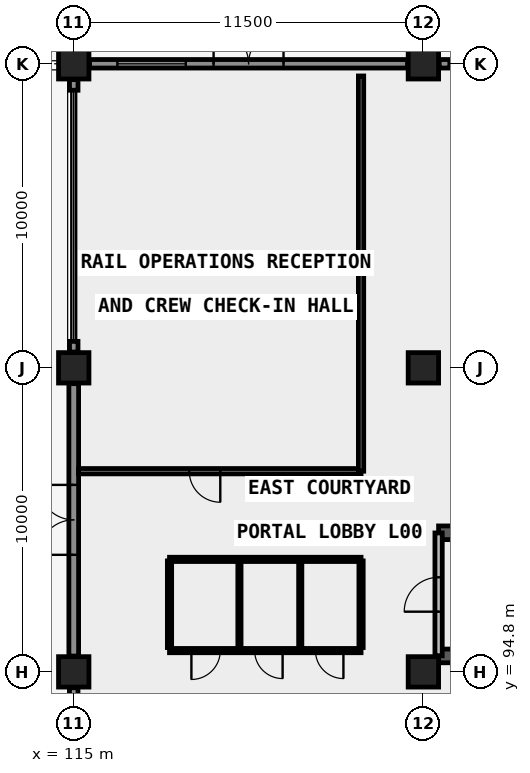
"""IFC4 building model, lengths in metres.
Left out: names, types, materials, properties, quantities, classifications, styles, units other than length and angle.
Written with IfcOpenShell. Run it as: python <this file> out.ifc"""

import sys

from ifc_helpers import new_model, si_unit, direction, frame, frame_2d, origin, origin_2d, place, context, subcontext, project, spatial, rectangle, extrude, element, fill, save


model = new_model("IFC4")
c1 = context("Model", 3, precision=1e-05, world=origin(), true_north=direction((0.0, 1.0)))
c2 = subcontext(c1, "Body", "Model", "MODEL_VIEW")
j1 = project(units=[si_unit("LENGTHUNIT", "METRE"), si_unit("PLANEANGLEUNIT", "RADIAN")], contexts=[c1])
p1 = place(None, origin())
s1 = spatial("IfcSite", under=j1, at=p1, CompositionType="ELEMENT")
p2 = place(p1, origin())
s2 = spatial("IfcBuilding", under=s1, at=p2, CompositionType="ELEMENT")
p3 = place(p2, origin())
s3 = spatial("IfcBuildingStorey", under=s2, at=p3, CompositionType="ELEMENT", Elevation=0.0)
for number, where, z_axis, x_axis in (
    (1, (115.0, 94.8, 0.0), (0.0, 0.0, 1.0), (1.0, 0.0, 0.0)),
    (2, (115.0, 104.8, 0.0), (0.0, 0.0, 1.0), (1.0, 0.0, 0.0)),
    (3, (115.0, 114.8, 0.0), (0.0, 0.0, 1.0), (1.0, 0.0, 0.0)),
    (4, (126.5, 94.8, 0.0), (0.0, 0.0, 1.0), (1.0, 0.0, 0.0)),
    (5, (126.5, 104.8, 0.0), (0.0, 0.0, 1.0), (1.0, 0.0, 0.0)),
    (6, (126.5, 114.8, 0.0), (0.0, 0.0, 1.0), (1.0, 0.0, 0.0)),
):
    element("IfcColumn", number, at=place(p3, frame(where, z_axis=z_axis, x_axis=x_axis)), inside=s3, PredefinedType="COLUMN", context=c2, shape_type="SweptSolid", body=[
        extrude(rectangle(XDim=1.0, YDim=1.0, at=origin_2d()), origin(), (0.0, 0.0, 1.0), 4.2),
    ])
p4 = place(p3, frame((127.0, 95.325, 0.0), z_axis=(0.0, 0.0, 1.0), x_axis=(1.0, 0.0, 0.0)))
e7 = element("IfcWall", 7, at=p4, inside=s3, PredefinedType="SHEAR", context=c2, shape_type="SweptSolid", body=[
    extrude(rectangle(XDim=9.15, YDim=0.45, at=frame_2d((4.575, 0.0))), origin(), (0.0, 0.0, 1.0), 4.2),
])
p5 = place(p3, frame((127.0, 99.375, 0.0), z_axis=(0.0, 0.0, 1.0), x_axis=(1.0, 0.0, 0.0)))
e8 = element("IfcWall", 8, at=p5, inside=s3, PredefinedType="SHEAR", context=c2, shape_type="SweptSolid", body=[
    extrude(rectangle(XDim=9.15, YDim=0.45, at=frame_2d((4.575, 0.0))), origin(), (0.0, 0.0, 1.0), 4.2),
])
p6 = place(p5, frame((0.55, 0.0, 0.0)))
e9 = element("IfcOpeningElement", 9, at=p6, cuts=e8, PredefinedType="OPENING", context=c2, shape_type="SweptSolid", body=[
    extrude(rectangle(XDim=1.13, YDim=2.15, at=frame_2d((0.565, 1.075))), frame((0.0, 0.235, 0.0), z_axis=(0.0, -1.0, 0.0), x_axis=(1.0, 0.0, 0.0)), (0.0, 0.0, 1.0), 0.47),
])
p7 = place(p3, frame((115.52, 114.8, 0.0), z_axis=(0.0, 0.0, 1.0), x_axis=(1.0, 0.0, 0.0)))
e10 = element("IfcWall", 10, at=p7, inside=s3, PredefinedType="SOLIDWALL", context=c2, shape_type="SweptSolid", body=[
    extrude(rectangle(XDim=10.46, YDim=0.28, at=frame_2d((5.23, 0.0))), origin(), (0.0, 0.0, 1.0), 3.15),
])
p8 = place(p7, frame((4.08, 0.0, 0.0)))
e11 = element("IfcOpeningElement", 11, at=p8, cuts=e10, PredefinedType="OPENING", context=c2, shape_type="SweptSolid", body=[
    extrude(rectangle(XDim=2.3, YDim=2.55, at=frame_2d((1.15, 1.275))), frame((0.0, 0.15, 0.0), z_axis=(0.0, -1.0, 0.0), x_axis=(1.0, 0.0, 0.0)), (0.0, 0.0, 1.0), 0.3),
])
p9 = place(p7, frame((0.915, 0.0, 0.78)))
e12 = element("IfcOpeningElement", 12, at=p9, cuts=e10, PredefinedType="OPENING", context=c2, shape_type="SweptSolid", body=[
    extrude(rectangle(XDim=2.25, YDim=2.05, at=frame_2d((1.125, 1.025))), frame((0.0, 0.15, 0.0), z_axis=(0.0, -1.0, 0.0), x_axis=(1.0, 0.0, 0.0)), (0.0, 0.0, 1.0), 0.3),
])
for number, where, z_axis, x_axis in (
    (13, (127.02, 114.8, 0.0), (0.0, 0.0, 1.0), (1.0, 0.0, 0.0)),
    (14, (115.0, 93.93, 0.0), (0.0, 0.0, 1.0), (0.0, 1.0, 0.0)),
):
    element("IfcWall", number, at=place(p3, frame(where, z_axis=z_axis, x_axis=x_axis)), inside=s3, PredefinedType="SOLIDWALL", context=c2, shape_type="SweptSolid", body=[
        extrude(rectangle(XDim=0.35, YDim=0.28, at=frame_2d((0.175, 0.0))), origin(), (0.0, 0.0, 1.0), 3.93),
    ])
p10 = place(p3, frame((115.0, 95.32, 0.0), z_axis=(0.0, 0.0, 1.0), x_axis=(0.0, 1.0, 0.0)))
e15 = element("IfcWall", 15, at=p10, inside=s3, PredefinedType="SOLIDWALL", context=c2, shape_type="SweptSolid", body=[
    extrude(rectangle(XDim=8.96, YDim=0.32, at=frame_2d((4.48, 0.0))), origin(), (0.0, 0.0, 1.0), 3.15),
])
p11 = place(p10, frame((3.33, 0.0, 0.0)))
e16 = element("IfcOpeningElement", 16, at=p11, cuts=e15, PredefinedType="OPENING", context=c2, shape_type="SweptSolid", body=[
    extrude(rectangle(XDim=2.3, YDim=2.55, at=frame_2d((1.15, 1.275))), frame((0.0, 0.17, 0.0), z_axis=(0.0, -1.0, 0.0), x_axis=(1.0, 0.0, 0.0)), (0.0, 0.0, 1.0), 0.34),
])
p12 = place(p3, frame((115.0, 105.32, 0.0), z_axis=(0.0, 0.0, 1.0), x_axis=(0.0, 1.0, 0.0)))
e17 = element("IfcWall", 17, at=p12, inside=s3, PredefinedType="SOLIDWALL", context=c2, shape_type="SweptSolid", body=[
    extrude(rectangle(XDim=0.35, YDim=0.28, at=frame_2d((0.175, 0.0))), origin(), (0.0, 0.0, 1.0), 3.93),
])
p13 = place(p3, frame((115.0, 113.93, 0.0), z_axis=(0.0, 0.0, 1.0), x_axis=(0.0, 1.0, 0.0)))
e18 = element("IfcWall", 18, at=p13, inside=s3, PredefinedType="SOLIDWALL", context=c2, shape_type="SweptSolid", body=[
    extrude(rectangle(XDim=0.35, YDim=0.28, at=frame_2d((0.175, 0.0))), origin(), (0.0, 0.0, 1.0), 3.93),
])
p14 = place(p3, frame((127.0, 95.33, 0.0), z_axis=(0.0, 0.0, 1.0), x_axis=(0.0, 1.0, 0.0)))
e19 = element("IfcWall", 19, at=p14, inside=s3, PredefinedType="SOLIDWALL", context=c2, shape_type="SweptSolid", body=[
    extrude(rectangle(XDim=4.04, YDim=0.24, at=frame_2d((2.02, 0.0))), origin(), (0.0, 0.0, 1.0), 3.88),
])
p15 = place(p14, frame((1.45, 0.0, 0.0)))
e20 = element("IfcOpeningElement", 20, at=p15, cuts=e19, PredefinedType="OPENING", context=c2, shape_type="SweptSolid", body=[
    extrude(rectangle(XDim=1.13, YDim=2.15, at=frame_2d((0.565, 1.075))), frame((0.0, 0.13, 0.0), z_axis=(0.0, -1.0, 0.0), x_axis=(1.0, 0.0, 0.0)), (0.0, 0.0, 1.0), 0.26),
])
p16 = place(p3, frame((118.15, 95.5, 0.0), z_axis=(0.0, 0.0, 1.0), x_axis=(1.0, 0.0, 0.0)))
e21 = element("IfcWall", 21, at=p16, inside=s3, PredefinedType="PLUMBINGWALL", context=c2, shape_type="SweptSolid", body=[
    extrude(rectangle(XDim=6.3, YDim=0.14, at=frame_2d((3.15, 0.0))), origin(), (0.0, 0.0, 1.0), 3.88),
])
p17 = place(p16, frame((0.72, 0.0, 0.0)))
e22 = element("IfcOpeningElement", 22, at=p17, cuts=e21, PredefinedType="OPENING", context=c2, shape_type="SweptSolid", body=[
    extrude(rectangle(XDim=0.95, YDim=2.1, at=frame_2d((0.475, 1.05))), frame((0.0, 0.08, 0.0), z_axis=(0.0, -1.0, 0.0), x_axis=(1.0, 0.0, 0.0)), (0.0, 0.0, 1.0), 0.16),
])
p18 = place(p16, frame((2.8, 0.0, 0.0)))
e23 = element("IfcOpeningElement", 23, at=p18, cuts=e21, PredefinedType="OPENING", context=c2, shape_type="SweptSolid", body=[
    extrude(rectangle(XDim=0.92, YDim=2.1, at=frame_2d((0.46, 1.05))), frame((0.0, 0.08, 0.0), z_axis=(0.0, -1.0, 0.0), x_axis=(1.0, 0.0, 0.0)), (0.0, 0.0, 1.0), 0.16),
])
p19 = place(p16, frame((4.8, 0.0, 0.0)))
e24 = element("IfcOpeningElement", 24, at=p19, cuts=e21, PredefinedType="OPENING", context=c2, shape_type="SweptSolid", body=[
    extrude(rectangle(XDim=0.92, YDim=2.1, at=frame_2d((0.46, 1.05))), frame((0.0, 0.08, 0.0), z_axis=(0.0, -1.0, 0.0), x_axis=(1.0, 0.0, 0.0)), (0.0, 0.0, 1.0), 0.16),
])
p20 = place(p3, frame((118.15, 95.6, 0.0), z_axis=(0.0, 0.0, 1.0), x_axis=(0.0, 1.0, 0.0)))
e25 = element("IfcWall", 25, at=p20, inside=s3, PredefinedType="PLUMBINGWALL", context=c2, shape_type="SweptSolid", body=[
    extrude(rectangle(XDim=2.85, YDim=0.14, at=frame_2d((1.425, 0.0))), origin(), (0.0, 0.0, 1.0), 3.88),
])
for number, where, z_axis, x_axis in (
    (26, (120.45, 95.6, 0.0), (0.0, 0.0, 1.0), (0.0, 1.0, 0.0)),
    (27, (122.45, 95.6, 0.0), (0.0, 0.0, 1.0), (0.0, 1.0, 0.0)),
):
    element("IfcWall", number, at=place(p3, frame(where, z_axis=z_axis, x_axis=x_axis)), inside=s3, PredefinedType="PARTITIONING", context=c2, shape_type="SweptSolid", body=[
        extrude(rectangle(XDim=2.85, YDim=0.105, at=frame_2d((1.425, 0.0))), origin(), (0.0, 0.0, 1.0), 3.88),
    ])
p21 = place(p3, frame((124.45, 95.6, 0.0), z_axis=(0.0, 0.0, 1.0), x_axis=(0.0, 1.0, 0.0)))
e28 = element("IfcWall", 28, at=p21, inside=s3, PredefinedType="PLUMBINGWALL", context=c2, shape_type="SweptSolid", body=[
    extrude(rectangle(XDim=2.85, YDim=0.14, at=frame_2d((1.425, 0.0))), origin(), (0.0, 0.0, 1.0), 3.88),
])
p22 = place(p3, frame((118.15, 98.5, 0.0), z_axis=(0.0, 0.0, 1.0), x_axis=(1.0, 0.0, 0.0)))
e29 = element("IfcWall", 29, at=p22, inside=s3, PredefinedType="PLUMBINGWALL", context=c2, shape_type="SweptSolid", body=[
    extrude(rectangle(XDim=6.3, YDim=0.14, at=frame_2d((3.15, 0.0))), origin(), (0.0, 0.0, 1.0), 3.88),
])
p23 = place(p3, frame((115.16, 101.4, 0.0), z_axis=(0.0, 0.0, 1.0), x_axis=(1.0, 0.0, 0.0)))
e30 = element("IfcWall", 30, at=p23, inside=s3, PredefinedType="PARTITIONING", context=c2, shape_type="SweptSolid", body=[
    extrude(rectangle(XDim=9.29, YDim=0.175, at=frame_2d((4.645, 0.0))), origin(), (0.0, 0.0, 1.0), 3.88),
])
p24 = place(p23, frame((3.64, 0.0, 0.0)))
e31 = element("IfcOpeningElement", 31, at=p24, cuts=e30, PredefinedType="OPENING", context=c2, shape_type="SweptSolid", body=[
    extrude(rectangle(XDim=1.02, YDim=2.15, at=frame_2d((0.51, 1.075))), frame((0.0, 0.098, 0.0), z_axis=(0.0, -1.0, 0.0), x_axis=(1.0, 0.0, 0.0)), (0.0, 0.0, 1.0), 0.195),
])
p25 = place(p3, frame((124.45, 101.4, 0.0), z_axis=(0.0, 0.0, 1.0), x_axis=(0.0, 1.0, 0.0)))
e32 = element("IfcWall", 32, at=p25, inside=s3, PredefinedType="PARTITIONING", context=c2, shape_type="SweptSolid", body=[
    extrude(rectangle(XDim=13.0, YDim=0.175, at=frame_2d((6.5, 0.0))), origin(), (0.0, 0.0, 1.0), 3.88),
])
p26 = place(p8, origin())
e33 = element("IfcDoor", 33, at=p26, inside=s3, OperationType="DOUBLE_DOOR_SINGLE_SWING", PredefinedType="DOOR", context=c2, shape_type="SweptSolid", body=[
    extrude(rectangle(XDim=2.3, YDim=2.55, at=frame_2d((1.15, 1.275))), frame((0.0, 0.025, 0.0), z_axis=(0.0, -1.0, 0.0), x_axis=(1.0, 0.0, 0.0)), (0.0, 0.0, 1.0), 0.05),
])
fill(e11, e33)
p27 = place(p9, origin())
e34 = element("IfcWindow", 34, at=p27, inside=s3, PartitioningType="SINGLE_PANEL", PredefinedType="WINDOW", context=c2, shape_type="SweptSolid", body=[
    extrude(rectangle(XDim=2.25, YDim=2.05, at=frame_2d((1.125, 1.025))), frame((0.0, 0.03, 0.0), z_axis=(0.0, -1.0, 0.0), x_axis=(1.0, 0.0, 0.0)), (0.0, 0.0, 1.0), 0.06),
])
fill(e12, e34)
p28 = place(p11, origin())
e35 = element("IfcDoor", 35, at=p28, inside=s3, OperationType="DOUBLE_DOOR_SINGLE_SWING", PredefinedType="DOOR", context=c2, shape_type="SweptSolid", body=[
    extrude(rectangle(XDim=2.3, YDim=2.55, at=frame_2d((1.15, 1.275))), frame((0.0, 0.025, 0.0), z_axis=(0.0, -1.0, 0.0), x_axis=(1.0, 0.0, 0.0)), (0.0, 0.0, 1.0), 0.05),
])
fill(e16, e35)
p29 = place(p15, origin())
e36 = element("IfcDoor", 36, at=p29, inside=s3, OperationType="SINGLE_SWING_LEFT", PredefinedType="DOOR", context=c2, shape_type="SweptSolid", body=[
    extrude(rectangle(XDim=1.13, YDim=2.15, at=frame_2d((0.565, 1.075))), frame((0.0, 0.025, 0.0), z_axis=(0.0, -1.0, 0.0), x_axis=(1.0, 0.0, 0.0)), (0.0, 0.0, 1.0), 0.05),
])
fill(e20, e36)
p30 = place(p17, frame((0.475, 0.0, 0.0), z_axis=(0.0, 0.0, 1.0), x_axis=(-1.0, 0.0, 0.0)))
e37 = element("IfcDoor", 37, at=p30, inside=s3, OperationType="SINGLE_SWING_LEFT", PredefinedType="DOOR", context=c2, shape_type="SweptSolid", body=[
    extrude(rectangle(XDim=0.95, YDim=2.1, at=frame_2d((0.0, 1.05))), frame((0.0, 0.025, 0.0), z_axis=(0.0, -1.0, 0.0), x_axis=(1.0, 0.0, 0.0)), (0.0, 0.0, 1.0), 0.05),
])
fill(e22, e37)
p31 = place(p18, origin())
e38 = element("IfcDoor", 38, at=p31, inside=s3, OperationType="SINGLE_SWING_RIGHT", PredefinedType="DOOR", context=c2, shape_type="SweptSolid", body=[
    extrude(rectangle(XDim=0.92, YDim=2.1, at=frame_2d((0.46, 1.05))), frame((0.0, 0.025, 0.0), z_axis=(0.0, -1.0, 0.0), x_axis=(1.0, 0.0, 0.0)), (0.0, 0.0, 1.0), 0.05),
])
fill(e23, e38)
p32 = place(p19, origin())
e39 = element("IfcDoor", 39, at=p32, inside=s3, OperationType="SINGLE_SWING_RIGHT", PredefinedType="DOOR", context=c2, shape_type="SweptSolid", body=[
    extrude(rectangle(XDim=0.92, YDim=2.1, at=frame_2d((0.46, 1.05))), frame((0.0, 0.025, 0.0), z_axis=(0.0, -1.0, 0.0), x_axis=(1.0, 0.0, 0.0)), (0.0, 0.0, 1.0), 0.05),
])
fill(e24, e39)
p33 = place(p24, origin())
e40 = element("IfcDoor", 40, at=p33, inside=s3, OperationType="SINGLE_SWING_RIGHT", PredefinedType="DOOR", context=c2, shape_type="SweptSolid", body=[
    extrude(rectangle(XDim=1.02, YDim=2.15, at=frame_2d((0.51, 1.075))), frame((0.0, 0.025, 0.0), z_axis=(0.0, -1.0, 0.0), x_axis=(1.0, 0.0, 0.0)), (0.0, 0.0, 1.0), 0.05),
])
fill(e31, e40)
save(model, sys.argv[1])
